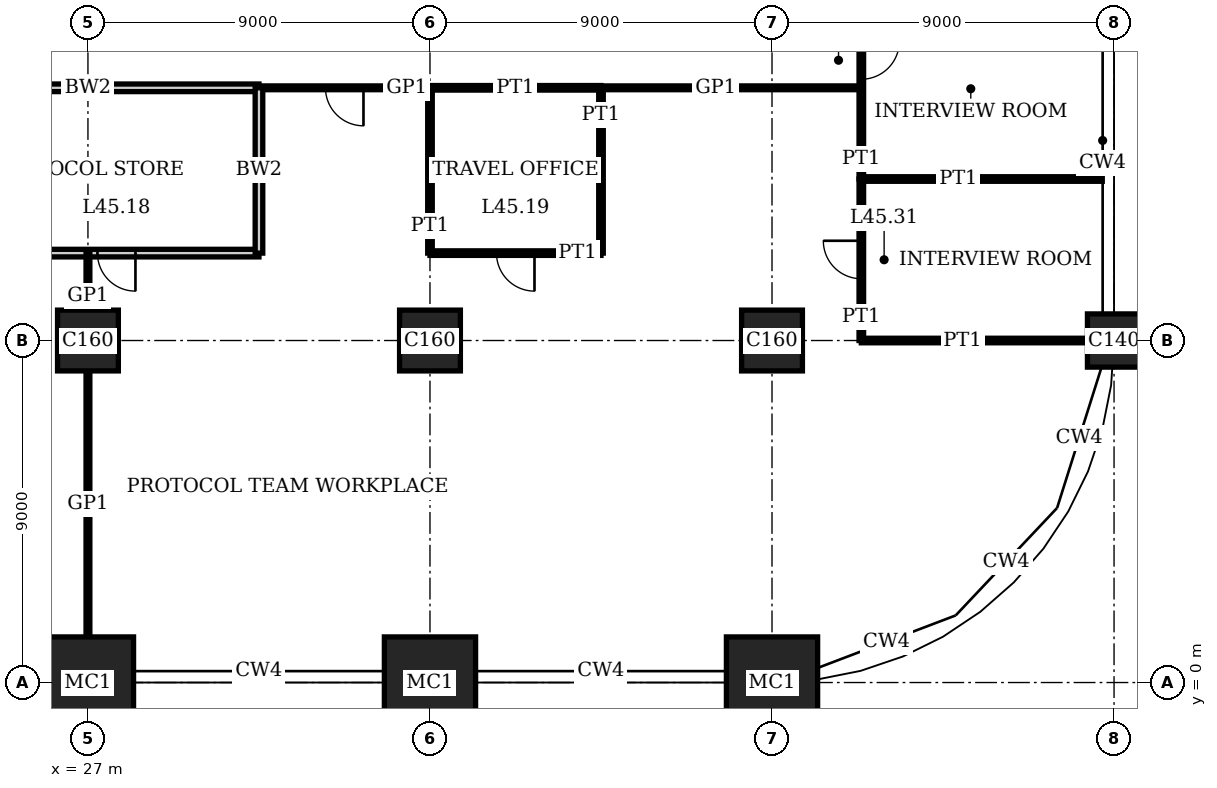
"""IFC4 building model, lengths in metres.
Left out: names, types, materials, properties, quantities, classifications, styles, units other than length and angle.
Written with IfcOpenShell. Run it as: python <this file> out.ifc"""

import sys

from ifc_helpers import new_model, si_unit, direction, frame, frame_2d, origin, origin_2d, place, context, subcontext, project, spatial, rectangle, extrude, element, fill, save


model = new_model("IFC4")
c1 = context("Model", 3, precision=1e-05, world=origin(), true_north=direction((0.0, 1.0)))
c2 = subcontext(c1, "Body", "Model", "MODEL_VIEW")
j1 = project(units=[si_unit("LENGTHUNIT", "METRE"), si_unit("PLANEANGLEUNIT", "RADIAN")], contexts=[c1])
p1 = place(None, origin())
s1 = spatial("IfcSite", under=j1, at=p1, CompositionType="ELEMENT")
p2 = place(p1, origin())
s2 = spatial("IfcBuilding", under=s1, at=p2, CompositionType="ELEMENT")
p3 = place(p2, frame((0.0, 0.0, 186.2)))
s3 = spatial("IfcBuildingStorey", under=s2, at=p3, CompositionType="ELEMENT", Elevation=186.2)
p4 = place(p3, frame((27.0, 0.0, 0.0), z_axis=(0.0, 0.0, 1.0), x_axis=(1.0, 0.0, 0.0)))
e1 = element("IfcColumn", 1, at=p4, inside=s3, PredefinedType="COLUMN", context=c2, shape_type="SweptSolid", body=[
    extrude(rectangle(XDim=2.4, YDim=2.4, at=origin_2d()), origin(), (0.0, 0.0, 1.0), 4.0),
])
p5 = place(p3, frame((27.0, 9.0, 0.0), z_axis=(0.0, 0.0, 1.0), x_axis=(1.0, 0.0, 0.0)))
e2 = element("IfcColumn", 2, at=p5, inside=s3, PredefinedType="COLUMN", context=c2, shape_type="SweptSolid", body=[
    extrude(rectangle(XDim=1.6, YDim=1.6, at=origin_2d()), origin(), (0.0, 0.0, 1.0), 4.0),
])
p6 = place(p3, frame((36.0, 0.0, 0.0), z_axis=(0.0, 0.0, 1.0), x_axis=(1.0, 0.0, 0.0)))
e3 = element("IfcColumn", 3, at=p6, inside=s3, PredefinedType="COLUMN", context=c2, shape_type="SweptSolid", body=[
    extrude(rectangle(XDim=2.4, YDim=2.4, at=origin_2d()), origin(), (0.0, 0.0, 1.0), 4.0),
])
p7 = place(p3, frame((36.0, 9.0, 0.0), z_axis=(0.0, 0.0, 1.0), x_axis=(1.0, 0.0, 0.0)))
e4 = element("IfcColumn", 4, at=p7, inside=s3, PredefinedType="COLUMN", context=c2, shape_type="SweptSolid", body=[
    extrude(rectangle(XDim=1.6, YDim=1.6, at=origin_2d()), origin(), (0.0, 0.0, 1.0), 4.0),
])
p8 = place(p3, frame((45.0, 0.0, 0.0), z_axis=(0.0, 0.0, 1.0), x_axis=(1.0, 0.0, 0.0)))
e5 = element("IfcColumn", 5, at=p8, inside=s3, PredefinedType="COLUMN", context=c2, shape_type="SweptSolid", body=[
    extrude(rectangle(XDim=2.4, YDim=2.4, at=origin_2d()), origin(), (0.0, 0.0, 1.0), 4.0),
])
p9 = place(p3, frame((45.0, 9.0, 0.0), z_axis=(0.0, 0.0, 1.0), x_axis=(1.0, 0.0, 0.0)))
e6 = element("IfcColumn", 6, at=p9, inside=s3, PredefinedType="COLUMN", context=c2, shape_type="SweptSolid", body=[
    extrude(rectangle(XDim=1.6, YDim=1.6, at=origin_2d()), origin(), (0.0, 0.0, 1.0), 4.0),
])
p10 = place(p3, frame((54.0, 9.0, 0.0), z_axis=(0.0, 0.0, 1.0), x_axis=(1.0, 0.0, 0.0)))
e7 = element("IfcColumn", 7, at=p10, inside=s3, PredefinedType="COLUMN", context=c2, shape_type="SweptSolid", body=[
    extrude(rectangle(XDim=1.4, YDim=1.4, at=origin_2d()), origin(), (0.0, 0.0, 1.0), 4.0),
])
p11 = place(p3, frame((47.35, 9.0, 0.0), z_axis=(0.0, 0.0, 1.0), x_axis=(1.0, 0.0, 0.0)))
e8 = element("IfcWall", 8, at=p11, inside=s3, PredefinedType="PARTITIONING", context=c2, shape_type="SweptSolid", body=[
    extrude(rectangle(XDim=5.95, YDim=0.12, at=frame_2d((2.975, 0.0))), origin(), (0.0, 0.0, 1.0), 3.05),
])
p12 = place(p3, frame((22.5, 11.3, 0.0), z_axis=(0.0, 0.0, 1.0), x_axis=(1.0, 0.0, 0.0)))
e9 = element("IfcWall", 9, at=p12, inside=s3, PredefinedType="SOLIDWALL", context=c2, shape_type="SweptSolid", body=[
    extrude(rectangle(XDim=9.0, YDim=0.2, at=frame_2d((4.5, 0.0))), origin(), (0.0, 0.0, 1.0), 3.75),
])
p13 = place(p12, frame((4.75, 0.0, 0.0)))
e10 = element("IfcOpeningElement", 10, at=p13, cuts=e9, PredefinedType="OPENING", context=c2, shape_type="SweptSolid", body=[
    extrude(rectangle(XDim=1.0, YDim=2.4, at=frame_2d((0.5, 1.2))), frame((0.0, 0.11, 0.0), z_axis=(0.0, -1.0, 0.0), x_axis=(1.0, 0.0, 0.0)), (0.0, 0.0, 1.0), 0.22),
])
p14 = place(p3, frame((36.0, 11.3, 0.0), z_axis=(0.0, 0.0, 1.0), x_axis=(1.0, 0.0, 0.0)))
e11 = element("IfcWall", 11, at=p14, inside=s3, PredefinedType="PARTITIONING", context=c2, shape_type="SweptSolid", body=[
    extrude(rectangle(XDim=4.5, YDim=0.12, at=frame_2d((2.25, 0.0))), origin(), (0.0, 0.0, 1.0), 3.75),
])
p15 = place(p14, frame((1.75, 0.0, 0.0)))
e12 = element("IfcOpeningElement", 12, at=p15, cuts=e11, PredefinedType="OPENING", context=c2, shape_type="SweptSolid", body=[
    extrude(rectangle(XDim=1.0, YDim=2.4, at=frame_2d((0.5, 1.2))), frame((0.0, 0.07, 0.0), z_axis=(0.0, -1.0, 0.0), x_axis=(1.0, 0.0, 0.0)), (0.0, 0.0, 1.0), 0.14),
])
p16 = place(p3, frame((47.35, 13.25, 0.0), z_axis=(0.0, 0.0, 1.0), x_axis=(1.0, 0.0, 0.0)))
e13 = element("IfcWall", 13, at=p16, inside=s3, PredefinedType="PARTITIONING", context=c2, shape_type="SweptSolid", body=[
    extrude(rectangle(XDim=6.34, YDim=0.12, at=frame_2d((3.17, 0.0))), origin(), (0.0, 0.0, 1.0), 3.1),
])
p17 = place(p3, frame((22.5, 15.65, 0.0), z_axis=(0.0, 0.0, 1.0), x_axis=(1.0, 0.0, 0.0)))
e14 = element("IfcWall", 14, at=p17, inside=s3, PredefinedType="SOLIDWALL", context=c2, shape_type="SweptSolid", body=[
    extrude(rectangle(XDim=9.0, YDim=0.2, at=frame_2d((4.5, 0.0))), origin(), (0.0, 0.0, 1.0), 3.75),
])
p18 = place(p3, frame((36.0, 15.65, 0.0), z_axis=(0.0, 0.0, 1.0), x_axis=(1.0, 0.0, 0.0)))
e15 = element("IfcWall", 15, at=p18, inside=s3, PredefinedType="PARTITIONING", context=c2, shape_type="SweptSolid", body=[
    extrude(rectangle(XDim=4.5, YDim=0.12, at=frame_2d((2.25, 0.0))), origin(), (0.0, 0.0, 1.0), 3.75),
])
p19 = place(p3, frame((31.5, 15.65, 0.0), z_axis=(0.0, 0.0, 1.0), x_axis=(1.0, 0.0, 0.0)))
e16 = element("IfcWall", 16, at=p19, inside=s3, PredefinedType="PARTITIONING", context=c2, shape_type="SweptSolid", body=[
    extrude(rectangle(XDim=4.5, YDim=0.1, at=frame_2d((2.25, 0.0))), origin(), (0.0, 0.0, 1.0), 3.75),
])
p20 = place(p19, frame((1.75, 0.0, 0.0)))
e17 = element("IfcOpeningElement", 17, at=p20, cuts=e16, PredefinedType="OPENING", context=c2, shape_type="SweptSolid", body=[
    extrude(rectangle(XDim=1.0, YDim=2.4, at=frame_2d((0.5, 1.2))), frame((0.0, 0.06, 0.0), z_axis=(0.0, -1.0, 0.0), x_axis=(1.0, 0.0, 0.0)), (0.0, 0.0, 1.0), 0.12),
])
p21 = place(p3, frame((40.5, 15.65, 0.0), z_axis=(0.0, 0.0, 1.0), x_axis=(1.0, 0.0, 0.0)))
e18 = element("IfcWall", 18, at=p21, inside=s3, PredefinedType="PARTITIONING", context=c2, shape_type="SweptSolid", body=[
    extrude(rectangle(XDim=6.85, YDim=0.1, at=frame_2d((3.425, 0.0))), origin(), (0.0, 0.0, 1.0), 3.75),
])
p22 = place(p3, frame((27.0, 1.2, 0.0), z_axis=(0.0, 0.0, 1.0), x_axis=(0.0, 1.0, 0.0)))
e19 = element("IfcWall", 19, at=p22, inside=s3, PredefinedType="PARTITIONING", context=c2, shape_type="SweptSolid", body=[
    extrude(rectangle(XDim=7.0, YDim=0.1, at=frame_2d((3.5, 0.0))), origin(), (0.0, 0.0, 1.0), 3.05),
])
p23 = place(p3, frame((27.0, 9.8, 0.0), z_axis=(0.0, 0.0, 1.0), x_axis=(0.0, 1.0, 0.0)))
e20 = element("IfcWall", 20, at=p23, inside=s3, PredefinedType="PARTITIONING", context=c2, shape_type="SweptSolid", body=[
    extrude(rectangle(XDim=1.51, YDim=0.1, at=frame_2d((0.755, 0.0))), origin(), (0.0, 0.0, 1.0), 3.05),
])
p24 = place(p3, frame((31.5, 11.3, 0.0), z_axis=(0.0, 0.0, 1.0), x_axis=(0.0, 1.0, 0.0)))
e21 = element("IfcWall", 21, at=p24, inside=s3, PredefinedType="SOLIDWALL", context=c2, shape_type="SweptSolid", body=[
    extrude(rectangle(XDim=4.35, YDim=0.2, at=frame_2d((2.175, 0.0))), origin(), (0.0, 0.0, 1.0), 3.75),
])
p25 = place(p3, frame((36.0, 11.3, 0.0), z_axis=(0.0, 0.0, 1.0), x_axis=(0.0, 1.0, 0.0)))
e22 = element("IfcWall", 22, at=p25, inside=s3, PredefinedType="PARTITIONING", context=c2, shape_type="SweptSolid", body=[
    extrude(rectangle(XDim=4.35, YDim=0.12, at=frame_2d((2.175, 0.0))), origin(), (0.0, 0.0, 1.0), 3.05),
])
p26 = place(p3, frame((40.5, 11.3, 0.0), z_axis=(0.0, 0.0, 1.0), x_axis=(0.0, 1.0, 0.0)))
e23 = element("IfcWall", 23, at=p26, inside=s3, PredefinedType="PARTITIONING", context=c2, shape_type="SweptSolid", body=[
    extrude(rectangle(XDim=4.35, YDim=0.12, at=frame_2d((2.175, 0.0))), origin(), (0.0, 0.0, 1.0), 3.75),
])
p27 = place(p3, frame((47.35, 9.0, 0.0), z_axis=(0.0, 0.0, 1.0), x_axis=(0.0, 1.0, 0.0)))
e24 = element("IfcWall", 24, at=p27, inside=s3, PredefinedType="PARTITIONING", context=c2, shape_type="SweptSolid", body=[
    extrude(rectangle(XDim=4.25, YDim=0.12, at=frame_2d((2.125, 0.0))), origin(), (0.0, 0.0, 1.0), 3.75),
])
p28 = place(p27, frame((1.625, 0.0, 0.0)))
e25 = element("IfcOpeningElement", 25, at=p28, cuts=e24, PredefinedType="OPENING", context=c2, shape_type="SweptSolid", body=[
    extrude(rectangle(XDim=1.0, YDim=2.4, at=frame_2d((0.5, 1.2))), frame((0.0, 0.07, 0.0), z_axis=(0.0, -1.0, 0.0), x_axis=(1.0, 0.0, 0.0)), (0.0, 0.0, 1.0), 0.14),
])
p29 = place(p3, frame((47.35, 13.25, 0.0), z_axis=(0.0, 0.0, 1.0), x_axis=(0.0, 1.0, 0.0)))
e26 = element("IfcWall", 26, at=p29, inside=s3, PredefinedType="PARTITIONING", context=c2, shape_type="SweptSolid", body=[
    extrude(rectangle(XDim=4.75, YDim=0.12, at=frame_2d((2.375, 0.0))), origin(), (0.0, 0.0, 1.0), 3.75),
])
p30 = place(p29, frame((2.625, 0.0, 0.0)))
e27 = element("IfcOpeningElement", 27, at=p30, cuts=e26, PredefinedType="OPENING", context=c2, shape_type="SweptSolid", body=[
    extrude(rectangle(XDim=1.0, YDim=2.4, at=frame_2d((0.5, 1.2))), frame((0.0, 0.07, 0.0), z_axis=(0.0, -1.0, 0.0), x_axis=(1.0, 0.0, 0.0)), (0.0, 0.0, 1.0), 0.14),
])
p31 = place(p13, origin())
e28 = element("IfcDoor", 28, at=p31, inside=s3, OperationType="SINGLE_SWING_RIGHT", PredefinedType="DOOR", context=c2, shape_type="SweptSolid", body=[
    extrude(rectangle(XDim=1.0, YDim=2.4, at=frame_2d((0.5, 1.2))), frame((0.0, 0.035, 0.0), z_axis=(0.0, -1.0, 0.0), x_axis=(1.0, 0.0, 0.0)), (0.0, 0.0, 1.0), 0.07),
])
fill(e10, e28)
p32 = place(p15, origin())
e29 = element("IfcDoor", 29, at=p32, inside=s3, OperationType="SINGLE_SWING_RIGHT", PredefinedType="DOOR", context=c2, shape_type="SweptSolid", body=[
    extrude(rectangle(XDim=1.0, YDim=2.4, at=frame_2d((0.5, 1.2))), frame((0.0, 0.025, 0.0), z_axis=(0.0, -1.0, 0.0), x_axis=(1.0, 0.0, 0.0)), (0.0, 0.0, 1.0), 0.05),
])
fill(e12, e29)
p33 = place(p20, origin())
e30 = element("IfcDoor", 30, at=p33, inside=s3, OperationType="SINGLE_SWING_RIGHT", PredefinedType="DOOR", context=c2, shape_type="SweptSolid", body=[
    extrude(rectangle(XDim=1.0, YDim=2.4, at=frame_2d((0.5, 1.2))), frame((0.0, 0.02, 0.0), z_axis=(0.0, -1.0, 0.0), x_axis=(1.0, 0.0, 0.0)), (0.0, 0.0, 1.0), 0.04),
])
fill(e17, e30)
p34 = place(p28, origin())
e31 = element("IfcDoor", 31, at=p34, inside=s3, OperationType="SINGLE_SWING_LEFT", PredefinedType="DOOR", context=c2, shape_type="SweptSolid", body=[
    extrude(rectangle(XDim=1.0, YDim=2.4, at=frame_2d((0.5, 1.2))), frame((0.0, 0.025, 0.0), z_axis=(0.0, -1.0, 0.0), x_axis=(1.0, 0.0, 0.0)), (0.0, 0.0, 1.0), 0.05),
])
fill(e25, e31)
p35 = place(p30, origin())
e32 = element("IfcDoor", 32, at=p35, inside=s3, OperationType="SINGLE_SWING_RIGHT", PredefinedType="DOOR", context=c2, shape_type="SweptSolid", body=[
    extrude(rectangle(XDim=1.0, YDim=2.4, at=frame_2d((0.5, 1.2))), frame((0.0, 0.025, 0.0), z_axis=(0.0, -1.0, 0.0), x_axis=(1.0, 0.0, 0.0)), (0.0, 0.0, 1.0), 0.05),
])
fill(e27, e32)
save(model, sys.argv[1])
